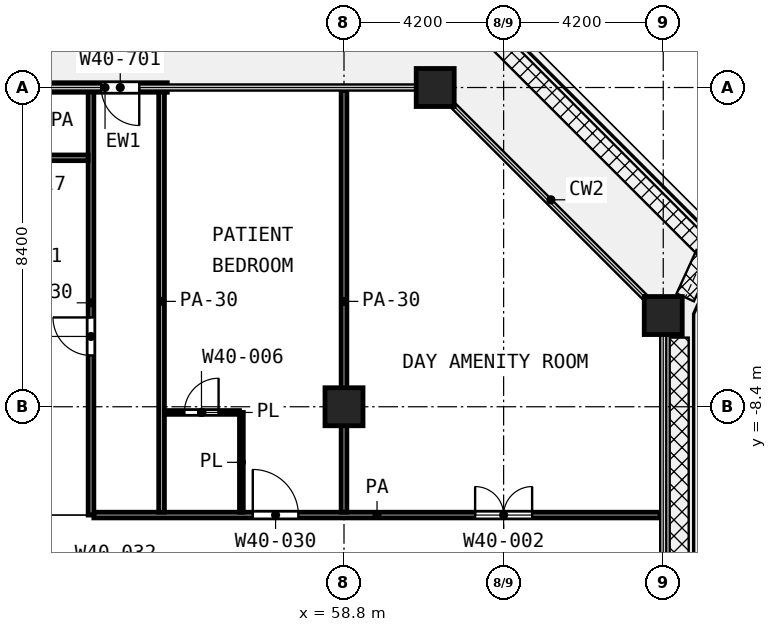
"""IFC4 building model, lengths in metres.
Left out: names, types, materials, properties, quantities, classifications, styles, units other than length and angle.
Written with IfcOpenShell. Run it as: python <this file> out.ifc"""

import sys

from ifc_helpers import new_model, si_unit, direction, frame, frame_2d, origin, origin_2d, place, context, subcontext, project, spatial, rectangle, extrude, element, fill, save


model = new_model("IFC4")
c1 = context("Model", 3, precision=1e-05, world=origin(), true_north=direction((0.0, 1.0)))
c2 = subcontext(c1, "Body", "Model", "MODEL_VIEW")
j1 = project(units=[si_unit("LENGTHUNIT", "METRE"), si_unit("PLANEANGLEUNIT", "RADIAN")], contexts=[c1])
p1 = place(None, origin())
s1 = spatial("IfcSite", under=j1, at=p1, CompositionType="ELEMENT")
p2 = place(p1, origin())
s2 = spatial("IfcBuilding", under=s1, at=p2, CompositionType="ELEMENT")
p3 = place(p2, frame((0.0, 0.0, 175.2)))
s3 = spatial("IfcBuildingStorey", under=s2, at=p3, CompositionType="ELEMENT", Elevation=175.2)
for number, where, z_axis, x_axis in (
    (1, (61.2, 0.0, 0.0), (0.0, 0.0, 1.0), (1.0, 0.0, 0.0)),
    (2, (67.2, -6.0, 0.0), (0.0, 0.0, 1.0), (1.0, 0.0, 0.0)),
    (3, (58.8, -8.4, 0.0), (0.0, 0.0, 1.0), (1.0, 0.0, 0.0)),
):
    element("IfcColumn", number, at=place(p3, frame(where, z_axis=z_axis, x_axis=x_axis)), inside=s3, PredefinedType="COLUMN", context=c2, shape_type="SweptSolid", body=[
        extrude(rectangle(XDim=1.0, YDim=1.0, at=origin_2d()), origin(), (0.0, 0.0, 1.0), 4.2),
    ])
p4 = place(p3, frame((54.15, 0.0, 0.0), z_axis=(0.0, 0.0, 1.0), x_axis=(-1.0, 0.0, 0.0)))
e4 = element("IfcWall", 4, at=p4, inside=s3, PredefinedType="SOLIDWALL", context=c2, shape_type="SweptSolid", body=[
    extrude(rectangle(XDim=3.275, YDim=0.25, at=frame_2d((1.637, 0.0))), origin(), (0.0, 0.0, 1.0), 2.58),
])
p5 = place(p4, frame((0.738, 0.0, 0.0)))
e5 = element("IfcOpeningElement", 5, at=p5, cuts=e4, PredefinedType="OPENING", context=c2, shape_type="SweptSolid", body=[
    extrude(rectangle(XDim=1.0, YDim=2.1, at=frame_2d((0.5, 1.05))), frame((0.0, 0.135, 0.0), z_axis=(0.0, -1.0, 0.0), x_axis=(1.0, 0.0, 0.0)), (0.0, 0.0, 1.0), 0.27),
])
p6 = place(p3, frame((54.075, -8.55, 0.0), z_axis=(0.0, 0.0, 1.0), x_axis=(1.0, 0.0, 0.0)))
e6 = element("IfcWall", 6, at=p6, inside=s3, PredefinedType="PARTITIONING", context=c2, shape_type="SweptSolid", body=[
    extrude(rectangle(XDim=1.975, YDim=0.1, at=frame_2d((0.988, 0.0))), origin(), (0.0, 0.0, 1.0), 3.6),
])
p7 = place(p6, frame((0.525, 0.0, 0.0)))
e7 = element("IfcOpeningElement", 7, at=p7, cuts=e6, PredefinedType="OPENING", context=c2, shape_type="SweptSolid", body=[
    extrude(rectangle(XDim=0.9, YDim=2.1, at=frame_2d((0.45, 1.05))), frame((0.0, 0.06, 0.0), z_axis=(0.0, -1.0, 0.0), x_axis=(1.0, 0.0, 0.0)), (0.0, 0.0, 1.0), 0.12),
])
p8 = place(p3, frame((56.1, -11.175, 0.0), z_axis=(0.0, 0.0, 1.0), x_axis=(0.0, 1.0, 0.0)))
e8 = element("IfcWall", 8, at=p8, inside=s3, PredefinedType="PARTITIONING", context=c2, shape_type="SweptSolid", body=[
    extrude(rectangle(XDim=2.625, YDim=0.1, at=frame_2d((1.312, 0.0))), origin(), (0.0, 0.0, 1.0), 3.6),
])
p9 = place(p3, frame((52.218, -11.25, 0.0), z_axis=(0.0, 0.0, 1.0), x_axis=(1.0, 0.0, 0.0)))
e9 = element("IfcWall", 9, at=p9, inside=s3, PredefinedType="PARTITIONING", context=c2, shape_type="SweptSolid", body=[
    extrude(rectangle(XDim=14.902, YDim=0.15, at=frame_2d((7.451, 0.0))), origin(), (0.0, 0.0, 1.0), 3.6),
])
p10 = place(p9, frame((4.182, 0.0, 0.0)))
e10 = element("IfcOpeningElement", 10, at=p10, cuts=e9, PredefinedType="OPENING", context=c2, shape_type="SweptSolid", body=[
    extrude(rectangle(XDim=1.2, YDim=2.1, at=frame_2d((0.6, 1.05))), frame((0.0, 0.085, 0.0), z_axis=(0.0, -1.0, 0.0), x_axis=(1.0, 0.0, 0.0)), (0.0, 0.0, 1.0), 0.17),
])
p11 = place(p9, frame((10.032, 0.0, 0.0)))
e11 = element("IfcOpeningElement", 11, at=p11, cuts=e9, PredefinedType="OPENING", context=c2, shape_type="SweptSolid", body=[
    extrude(rectangle(XDim=1.5, YDim=2.1, at=frame_2d((0.75, 1.05))), frame((0.0, 0.085, 0.0), z_axis=(0.0, -1.0, 0.0), x_axis=(1.0, 0.0, 0.0)), (0.0, 0.0, 1.0), 0.17),
])
p12 = place(p3, frame((48.63, -1.85, 0.0), z_axis=(0.0, 0.0, 1.0), x_axis=(1.0, 0.0, 0.0)))
e12 = element("IfcWall", 12, at=p12, inside=s3, PredefinedType="PARTITIONING", context=c2, shape_type="SweptSolid", body=[
    extrude(rectangle(XDim=3.438, YDim=0.15, at=frame_2d((1.719, 0.0))), origin(), (0.0, 0.0, 1.0), 3.6),
])
p13 = place(p12, frame((1.282, 0.0, 0.0)))
e13 = element("IfcOpeningElement", 13, at=p13, cuts=e12, PredefinedType="OPENING", context=c2, shape_type="SweptSolid", body=[
    extrude(rectangle(XDim=1.0, YDim=2.1, at=frame_2d((0.5, 1.05))), frame((0.0, 0.085, 0.0), z_axis=(0.0, -1.0, 0.0), x_axis=(1.0, 0.0, 0.0)), (0.0, 0.0, 1.0), 0.17),
])
p14 = place(p3, frame((52.143, -11.25, 0.0), z_axis=(0.0, 0.0, 1.0), x_axis=(0.0, 1.0, 0.0)))
e14 = element("IfcWall", 14, at=p14, inside=s3, PredefinedType="PARTITIONING", context=c2, shape_type="SweptSolid", body=[
    extrude(rectangle(XDim=11.17, YDim=0.15, at=frame_2d((5.585, 0.0))), origin(), (0.0, 0.0, 1.0), 2.7),
])
p15 = place(p14, frame((4.2, 0.0, 0.0)))
e15 = element("IfcOpeningElement", 15, at=p15, cuts=e14, PredefinedType="OPENING", context=c2, shape_type="SweptSolid", body=[
    extrude(rectangle(XDim=1.0, YDim=2.1, at=frame_2d((0.5, 1.05))), frame((0.0, 0.085, 0.0), z_axis=(0.0, -1.0, 0.0), x_axis=(1.0, 0.0, 0.0)), (0.0, 0.0, 1.0), 0.17),
])
for number, where, z_axis, x_axis in (
    (16, (54.0, -11.175, 0.0), (0.0, 0.0, 1.0), (0.0, 1.0, 0.0)),
    (17, (58.8, -11.175, 0.0), (0.0, 0.0, 1.0), (0.0, 1.0, 0.0)),
):
    element("IfcWall", number, at=place(p3, frame(where, z_axis=z_axis, x_axis=x_axis)), inside=s3, PredefinedType="PARTITIONING", context=c2, shape_type="SweptSolid", body=[
        extrude(rectangle(XDim=11.095, YDim=0.15, at=frame_2d((5.547, 0.0))), origin(), (0.0, 0.0, 1.0), 2.7),
    ])
p16 = place(p5, origin())
e18 = element("IfcDoor", 18, at=p16, inside=s3, OperationType="SINGLE_SWING_LEFT", PredefinedType="DOOR", context=c2, shape_type="SweptSolid", body=[
    extrude(rectangle(XDim=1.0, YDim=2.1, at=frame_2d((0.5, 1.05))), frame((0.0, 0.025, 0.0), z_axis=(0.0, -1.0, 0.0), x_axis=(1.0, 0.0, 0.0)), (0.0, 0.0, 1.0), 0.05),
])
fill(e5, e18)
p17 = place(p15, origin())
e19 = element("IfcDoor", 19, at=p17, inside=s3, OperationType="SINGLE_SWING_RIGHT", PredefinedType="DOOR", context=c2, shape_type="SweptSolid", body=[
    extrude(rectangle(XDim=1.0, YDim=2.1, at=frame_2d((0.5, 1.05))), frame((0.0, 0.025, 0.0), z_axis=(0.0, -1.0, 0.0), x_axis=(1.0, 0.0, 0.0)), (0.0, 0.0, 1.0), 0.05),
])
fill(e15, e19)
p18 = place(p10, origin())
e20 = element("IfcDoor", 20, at=p18, inside=s3, OperationType="SINGLE_SWING_LEFT", PredefinedType="DOOR", context=c2, shape_type="SweptSolid", body=[
    extrude(rectangle(XDim=1.2, YDim=2.1, at=frame_2d((0.6, 1.05))), frame((0.0, 0.025, 0.0), z_axis=(0.0, -1.0, 0.0), x_axis=(1.0, 0.0, 0.0)), (0.0, 0.0, 1.0), 0.05),
])
fill(e10, e20)
p19 = place(p7, origin())
e21 = element("IfcDoor", 21, at=p19, inside=s3, OperationType="SINGLE_SWING_RIGHT", PredefinedType="DOOR", context=c2, shape_type="SweptSolid", body=[
    extrude(rectangle(XDim=0.9, YDim=2.1, at=frame_2d((0.45, 1.05))), frame((0.0, 0.025, 0.0), z_axis=(0.0, -1.0, 0.0), x_axis=(1.0, 0.0, 0.0)), (0.0, 0.0, 1.0), 0.05),
])
fill(e7, e21)
p20 = place(p11, origin())
e22 = element("IfcDoor", 22, at=p20, inside=s3, OperationType="DOUBLE_DOOR_SINGLE_SWING", PredefinedType="DOOR", context=c2, shape_type="SweptSolid", body=[
    extrude(rectangle(XDim=1.5, YDim=2.1, at=frame_2d((0.75, 1.05))), frame((0.0, 0.025, 0.0), z_axis=(0.0, -1.0, 0.0), x_axis=(1.0, 0.0, 0.0)), (0.0, 0.0, 1.0), 0.05),
])
fill(e11, e22)
save(model, sys.argv[1])
